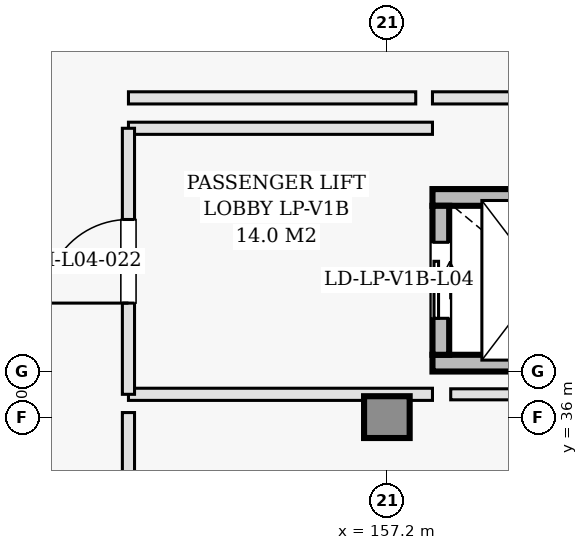
"""IFC4 building model, lengths in metres.
Left out: names, types, materials, properties, quantities, classifications, styles, units other than length and angle.
Written with IfcOpenShell. Run it as: python <this file> out.ifc"""

import sys

from ifc_helpers import new_model, si_unit, direction, frame, frame_2d, origin, origin_2d, place, context, subcontext, project, spatial, rectangle, extrude, element, fill, save


model = new_model("IFC4")
c1 = context("Model", 3, precision=1e-05, world=origin(), true_north=direction((0.0, 1.0)))
c2 = subcontext(c1, "Body", "Model", "MODEL_VIEW")
j1 = project(units=[si_unit("LENGTHUNIT", "METRE"), si_unit("PLANEANGLEUNIT", "RADIAN")], contexts=[c1])
p1 = place(None, origin())
s1 = spatial("IfcSite", under=j1, at=p1, CompositionType="ELEMENT")
p2 = place(p1, origin())
s2 = spatial("IfcBuilding", under=s1, at=p2, CompositionType="ELEMENT")
p3 = place(p2, frame((0.0, 0.0, 18.0)))
s3 = spatial("IfcBuildingStorey", under=s2, at=p3, CompositionType="ELEMENT", Elevation=18.0)
p4 = place(p3, frame((157.2, 36.0, 0.0), z_axis=(0.0, 0.0, 1.0), x_axis=(1.0, 0.0, 0.0)))
e1 = element("IfcColumn", 1, at=p4, inside=s3, PredefinedType="COLUMN", context=c2, shape_type="SweptSolid", body=[
    extrude(rectangle(XDim=0.55, YDim=0.55, at=origin_2d()), origin(), (0.0, 0.0, 1.0), 4.2),
])
for number, where, z_axis, x_axis in (
    (2, (157.8, 36.71, 0.0), (0.0, 0.0, 1.0), (1.0, 0.0, 0.0)),
    (3, (157.8, 38.89, 0.0), (0.0, 0.0, 1.0), (1.0, 0.0, 0.0)),
):
    element("IfcWall", number, at=place(p3, frame(where, z_axis=z_axis, x_axis=x_axis)), inside=s3, PredefinedType="SHEAR", context=c2, shape_type="SweptSolid", body=[
        extrude(rectangle(XDim=2.9, YDim=0.22, at=frame_2d((1.45, 0.0))), origin(), (0.0, 0.0, 1.0), 3.94),
    ])
p5 = place(p3, frame((157.91, 36.82, 0.0), z_axis=(0.0, 0.0, 1.0), x_axis=(0.0, 1.0, 0.0)))
e4 = element("IfcWall", 4, at=p5, inside=s3, PredefinedType="SHEAR", context=c2, shape_type="SweptSolid", body=[
    extrude(rectangle(XDim=1.96, YDim=0.22, at=frame_2d((0.98, 0.0))), origin(), (0.0, 0.0, 1.0), 3.94),
])
p6 = place(p5, frame((0.48, 0.0, 0.0)))
e5 = element("IfcOpeningElement", 5, at=p6, cuts=e4, PredefinedType="OPENING", context=c2, shape_type="SweptSolid", body=[
    extrude(rectangle(XDim=1.0, YDim=2.15, at=frame_2d((0.5, 1.075))), frame((0.0, 0.12, 0.0), z_axis=(0.0, -1.0, 0.0), x_axis=(1.0, 0.0, 0.0)), (0.0, 0.0, 1.0), 0.24),
])
p7 = place(p3, frame((153.8, 36.3, 0.0), z_axis=(0.0, 0.0, 1.0), x_axis=(1.0, 0.0, 0.0)))
e6 = element("IfcWall", 6, at=p7, inside=s3, PredefinedType="PARTITIONING", context=c2, shape_type="SweptSolid", body=[
    extrude(rectangle(XDim=4.0, YDim=0.16, at=frame_2d((2.0, 0.0))), origin(), (0.0, 0.0, 1.0), 3.125),
])
p8 = place(p3, frame((153.8, 39.8, 0.0), z_axis=(0.0, 0.0, 1.0), x_axis=(1.0, 0.0, 0.0)))
e7 = element("IfcWall", 7, at=p8, inside=s3, PredefinedType="PARTITIONING", context=c2, shape_type="SweptSolid", body=[
    extrude(rectangle(XDim=4.0, YDim=0.16, at=frame_2d((2.0, 0.0))), origin(), (0.0, 0.0, 1.0), 3.275),
])
p9 = place(p3, frame((153.8, 36.3, 0.0), z_axis=(0.0, 0.0, 1.0), x_axis=(0.0, 1.0, 0.0)))
e8 = element("IfcWall", 8, at=p9, inside=s3, PredefinedType="PARTITIONING", context=c2, shape_type="SweptSolid", body=[
    extrude(rectangle(XDim=3.5, YDim=0.16, at=frame_2d((1.75, 0.0))), origin(), (0.0, 0.0, 1.0), 3.485),
])
p10 = place(p9, frame((1.2, 0.0, 0.0)))
e9 = element("IfcOpeningElement", 9, at=p10, cuts=e8, PredefinedType="OPENING", context=c2, shape_type="SweptSolid", body=[
    extrude(rectangle(XDim=1.1, YDim=2.15, at=frame_2d((0.55, 1.075))), frame((0.0, 0.09, 0.0), z_axis=(0.0, -1.0, 0.0), x_axis=(1.0, 0.0, 0.0)), (0.0, 0.0, 1.0), 0.18),
])
p11 = place(p3, frame((153.8, 24.85, 0.0), z_axis=(0.0, 0.0, 1.0), x_axis=(0.0, 1.0, 0.0)))
e10 = element("IfcWall", 10, at=p11, inside=s3, PredefinedType="PARTITIONING", context=c2, shape_type="SweptSolid", body=[
    extrude(rectangle(XDim=11.21, YDim=0.16, at=frame_2d((5.605, 0.0))), origin(), (0.0, 0.0, 1.0), 3.125),
])
p12 = place(p3, frame((158.04, 36.3, 0.0), z_axis=(0.0, 0.0, 1.0), x_axis=(1.0, 0.0, 0.0)))
e11 = element("IfcWall", 11, at=p12, inside=s3, PredefinedType="PARTITIONING", context=c2, shape_type="SweptSolid", body=[
    extrude(rectangle(XDim=15.223, YDim=0.145, at=frame_2d((7.611, 0.0))), origin(), (0.0, 0.0, 1.0), 3.125),
])
p13 = place(p3, frame((157.8, 40.2, 0.0), z_axis=(0.0, 0.0, 1.0), x_axis=(1.0, 0.0, 0.0)))
e12 = element("IfcWall", 12, at=p13, inside=s3, PredefinedType="PARTITIONING", context=c2, shape_type="SweptSolid", body=[
    extrude(rectangle(XDim=2.58, YDim=0.16, at=frame_2d((1.29, 0.0))), origin(), (0.0, 0.0, 1.0), 3.94),
])
p14 = place(p3, frame((153.8, 40.2, 0.0), z_axis=(0.0, 0.0, 1.0), x_axis=(1.0, 0.0, 0.0)))
e13 = element("IfcWall", 13, at=p14, inside=s3, PredefinedType="PARTITIONING", context=c2, shape_type="SweptSolid", body=[
    extrude(rectangle(XDim=3.78, YDim=0.16, at=frame_2d((1.89, 0.0))), origin(), (0.0, 0.0, 1.0), 3.275),
])
p15 = place(p6, origin())
e14 = element("IfcDoor", 14, at=p15, inside=s3, OperationType="SLIDING_TO_LEFT", PredefinedType="DOOR", context=c2, shape_type="SweptSolid", body=[
    extrude(rectangle(XDim=1.0, YDim=2.15, at=frame_2d((0.5, 1.075))), frame((0.0, 0.025, 0.0), z_axis=(0.0, -1.0, 0.0), x_axis=(1.0, 0.0, 0.0)), (0.0, 0.0, 1.0), 0.05),
])
fill(e5, e14)
p16 = place(p10, origin())
e15 = element("IfcDoor", 15, at=p16, inside=s3, OperationType="SINGLE_SWING_LEFT", PredefinedType="DOOR", context=c2, shape_type="SweptSolid", body=[
    extrude(rectangle(XDim=1.1, YDim=2.15, at=frame_2d((0.55, 1.075))), frame((0.0, 0.025, 0.0), z_axis=(0.0, -1.0, 0.0), x_axis=(1.0, 0.0, 0.0)), (0.0, 0.0, 1.0), 0.05),
])
fill(e9, e15)
save(model, sys.argv[1])
